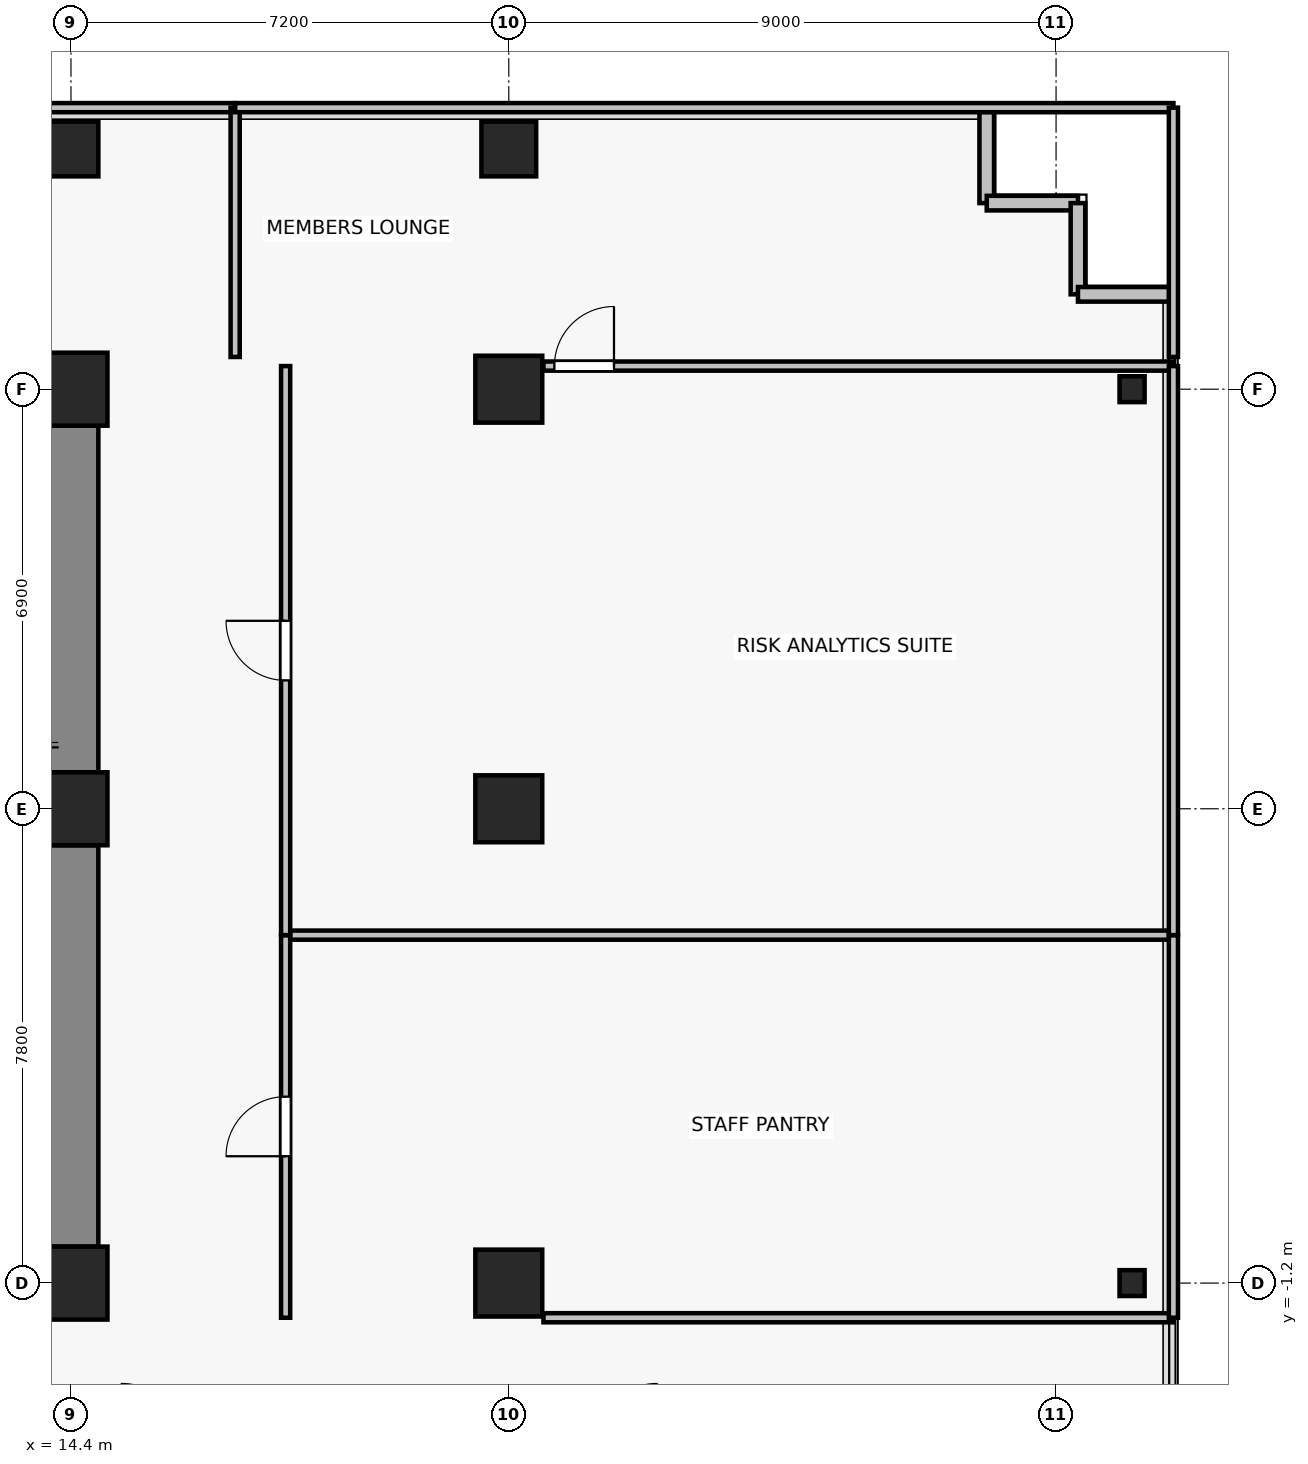
"""IFC4 building model, lengths in metres.
Left out: names, types, materials, properties, quantities, classifications, styles, units other than length and angle.
Written with IfcOpenShell. Run it as: python <this file> out.ifc"""

import sys

from ifc_helpers import new_model, si_unit, direction, frame, frame_2d, origin, origin_2d, place, context, subcontext, project, spatial, rectangle, i_section, extrude, source, transform, mapped, element, fill, save


model = new_model("IFC4")
c1 = context("Model", 3, precision=1e-05, world=origin(), true_north=direction((0.0, 1.0)))
c2 = subcontext(c1, "Body", "Model", "MODEL_VIEW")
j1 = project(units=[si_unit("LENGTHUNIT", "METRE"), si_unit("PLANEANGLEUNIT", "RADIAN")], contexts=[c1])
p1 = place(None, origin())
s1 = spatial("IfcSite", under=j1, at=p1, CompositionType="ELEMENT")
p2 = place(p1, origin())
s2 = spatial("IfcBuilding", under=s1, at=p2, CompositionType="ELEMENT")
p3 = place(p2, frame((0.0, 0.0, 67.0)))
s3 = spatial("IfcBuildingStorey", under=s2, at=p3, CompositionType="ELEMENT", Elevation=67.0)
for number, where, z_axis, x_axis in (
    (1, (14.4, -1.2, 0.0), (0.0, 0.0, 1.0), (1.0, 0.0, 0.0)),
    (2, (14.4, 6.6, 0.0), (0.0, 0.0, 1.0), (1.0, 0.0, 0.0)),
    (3, (14.4, 13.5, 0.0), (0.0, 0.0, 1.0), (1.0, 0.0, 0.0)),
):
    element("IfcColumn", number, at=place(p3, frame(where, z_axis=z_axis, x_axis=x_axis)), inside=s3, PredefinedType="COLUMN", context=c2, shape_type="SweptSolid", body=[
        extrude(rectangle(XDim=1.2, YDim=1.2, at=origin_2d()), origin(), (0.0, 0.0, 1.0), 3.3),
    ])
for number, where, z_axis, x_axis in (
    (4, (21.6, -1.2, 0.0), (0.0, 0.0, 1.0), (1.0, 0.0, 0.0)),
    (5, (21.6, 6.6, 0.0), (0.0, 0.0, 1.0), (1.0, 0.0, 0.0)),
    (6, (21.6, 13.5, 0.0), (0.0, 0.0, 1.0), (1.0, 0.0, 0.0)),
):
    element("IfcColumn", number, at=place(p3, frame(where, z_axis=z_axis, x_axis=x_axis)), inside=s3, PredefinedType="COLUMN", context=c2, shape_type="SweptSolid", body=[
        extrude(rectangle(XDim=1.1, YDim=1.1, at=origin_2d()), origin(), (0.0, 0.0, 1.0), 3.3),
    ])
for number, where, z_axis, x_axis in (
    (7, (14.4, 17.45, 0.0), (0.0, 0.0, 1.0), (1.0, 0.0, 0.0)),
    (8, (21.6, 17.45, 0.0), (0.0, 0.0, 1.0), (1.0, 0.0, 0.0)),
):
    element("IfcColumn", number, at=place(p3, frame(where, z_axis=z_axis, x_axis=x_axis)), inside=s3, PredefinedType="COLUMN", context=c2, shape_type="SweptSolid", body=[
        extrude(rectangle(XDim=0.9, YDim=0.9, at=origin_2d()), origin(), (0.0, 0.0, 1.0), 3.3),
    ])
for number, where, z_axis, x_axis in (
    (9, (31.85, -1.2, 0.0), (0.0, 0.0, 1.0), (1.0, 0.0, 0.0)),
    (10, (31.85, 13.5, 0.0), (0.0, 0.0, 1.0), (1.0, 0.0, 0.0)),
):
    element("IfcColumn", number, at=place(p3, frame(where, z_axis=z_axis, x_axis=x_axis)), inside=s3, PredefinedType="COLUMN", context=c2, shape_type="SweptSolid", body=[
        extrude(i_section(OverallWidth=0.412, OverallDepth=0.425, WebThickness=0.026, FlangeThickness=0.039, FilletRadius=0.015, at=origin_2d()), origin(), (0.0, 0.0, 1.0), 3.3),
    ])
p4 = place(p3, frame((14.4, -0.6, 0.0), z_axis=(0.0, 0.0, 1.0), x_axis=(0.0, 1.0, 0.0)))
e11 = element("IfcWall", 11, at=p4, inside=s3, PredefinedType="SHEAR", context=c2, shape_type="SweptSolid", body=[
    extrude(rectangle(XDim=6.6, YDim=0.9, at=frame_2d((3.3, 0.0))), origin(), (0.0, 0.0, 1.0), 3.075),
])
p5 = place(p3, frame((14.4, 7.2, 0.0), z_axis=(0.0, 0.0, 1.0), x_axis=(0.0, 1.0, 0.0)))
e12 = element("IfcWall", 12, at=p5, inside=s3, PredefinedType="SHEAR", context=c2, shape_type="SweptSolid", body=[
    extrude(rectangle(XDim=5.7, YDim=0.9, at=frame_2d((2.85, 0.0))), origin(), (0.0, 0.0, 1.0), 3.075),
])
for number, where, z_axis, x_axis in (
    (13, (29.46, 16.56, 0.0), (0.0, 0.0, 1.0), (0.0, 1.0, 0.0)),
    (14, (30.96, 16.56, 0.0), (0.0, 0.0, 1.0), (-1.0, 0.0, 0.0)),
    (15, (30.96, 15.06, 0.0), (0.0, 0.0, 1.0), (0.0, 1.0, 0.0)),
    (16, (32.46, 15.06, 0.0), (0.0, 0.0, 1.0), (-1.0, 0.0, 0.0)),
):
    element("IfcWall", number, at=place(p3, frame(where, z_axis=z_axis, x_axis=x_axis)), inside=s3, PredefinedType="SOLIDWALL", context=c2, shape_type="SweptSolid", body=[
        extrude(rectangle(XDim=1.5, YDim=0.24, at=frame_2d((0.75, 0.0))), origin(), (0.0, 0.0, 1.0), 3.075),
    ])
p6 = place(p3, frame((32.53, -1.77, 0.0), z_axis=(0.0, 0.0, 1.0), x_axis=(-1.0, 0.0, 0.0)))
e17 = element("IfcWall", 17, at=p6, inside=s3, PredefinedType="PARTITIONING", context=c2, shape_type="SweptSolid", body=[
    extrude(rectangle(XDim=10.36, YDim=0.15, at=frame_2d((5.18, 0.0))), origin(), (0.0, 0.0, 1.0), 2.465),
])
p7 = place(p3, frame((17.93, 4.522, 0.0), z_axis=(0.0, 0.0, 1.0), x_axis=(1.0, 0.0, 0.0)))
e18 = element("IfcWall", 18, at=p7, inside=s3, PredefinedType="PARTITIONING", context=c2, shape_type="SweptSolid", body=[
    extrude(rectangle(XDim=14.6, YDim=0.15, at=frame_2d((7.3, 0.0))), origin(), (0.0, 0.0, 1.0), 2.465),
])
p8 = place(p3, frame((17.93, -1.77, 0.0), z_axis=(0.0, 0.0, 1.0), x_axis=(0.0, 1.0, 0.0)))
e19 = element("IfcWall", 19, at=p8, inside=s3, PredefinedType="PARTITIONING", context=c2, shape_type="SweptSolid", body=[
    extrude(rectangle(XDim=6.292, YDim=0.15, at=frame_2d((3.146, 0.0))), origin(), (0.0, 0.0, 1.0), 2.465),
])
p9 = place(p8, frame((2.656, 0.0, 0.0)))
e20 = element("IfcOpeningElement", 20, at=p9, cuts=e19, PredefinedType="OPENING", context=c2, shape_type="SweptSolid", body=[
    extrude(rectangle(XDim=0.98, YDim=2.15, at=frame_2d((0.49, 1.075))), frame((0.0, 0.085, 0.0), z_axis=(0.0, -1.0, 0.0), x_axis=(1.0, 0.0, 0.0)), (0.0, 0.0, 1.0), 0.17),
])
p10 = place(p3, frame((32.53, 4.522, 0.0), z_axis=(0.0, 0.0, 1.0), x_axis=(0.0, -1.0, 0.0)))
e21 = element("IfcWall", 21, at=p10, inside=s3, PredefinedType="PARTITIONING", context=c2, shape_type="SweptSolid", body=[
    extrude(rectangle(XDim=6.292, YDim=0.15, at=frame_2d((3.146, 0.0))), origin(), (0.0, 0.0, 1.0), 3.075),
])
p11 = place(p3, frame((22.17, 13.88, 0.0), z_axis=(0.0, 0.0, 1.0), x_axis=(1.0, 0.0, 0.0)))
e22 = element("IfcWall", 22, at=p11, inside=s3, PredefinedType="PARTITIONING", context=c2, shape_type="SweptSolid", body=[
    extrude(rectangle(XDim=10.36, YDim=0.15, at=frame_2d((5.18, 0.0))), origin(), (0.0, 0.0, 1.0), 3.075),
])
p12 = place(p11, frame((0.18, 0.0, 0.0)))
e23 = element("IfcOpeningElement", 23, at=p12, cuts=e22, PredefinedType="OPENING", context=c2, shape_type="SweptSolid", body=[
    extrude(rectangle(XDim=0.98, YDim=2.15, at=frame_2d((0.49, 1.075))), frame((0.0, 0.085, 0.0), z_axis=(0.0, -1.0, 0.0), x_axis=(1.0, 0.0, 0.0)), (0.0, 0.0, 1.0), 0.17),
])
p13 = place(p3, frame((17.93, 4.522, 0.0), z_axis=(0.0, 0.0, 1.0), x_axis=(0.0, 1.0, 0.0)))
e24 = element("IfcWall", 24, at=p13, inside=s3, PredefinedType="PARTITIONING", context=c2, shape_type="SweptSolid", body=[
    extrude(rectangle(XDim=9.358, YDim=0.15, at=frame_2d((4.679, 0.0))), origin(), (0.0, 0.0, 1.0), 2.465),
])
p14 = place(p13, frame((4.189, 0.0, 0.0)))
e25 = element("IfcOpeningElement", 25, at=p14, cuts=e24, PredefinedType="OPENING", context=c2, shape_type="SweptSolid", body=[
    extrude(rectangle(XDim=0.98, YDim=2.15, at=frame_2d((0.49, 1.075))), frame((0.0, 0.085, 0.0), z_axis=(0.0, -1.0, 0.0), x_axis=(1.0, 0.0, 0.0)), (0.0, 0.0, 1.0), 0.17),
])
p15 = place(p3, frame((32.53, 13.88, 0.0), z_axis=(0.0, 0.0, 1.0), x_axis=(0.0, -1.0, 0.0)))
e26 = element("IfcWall", 26, at=p15, inside=s3, PredefinedType="PARTITIONING", context=c2, shape_type="SweptSolid", body=[
    extrude(rectangle(XDim=9.358, YDim=0.15, at=frame_2d((4.679, 0.0))), origin(), (0.0, 0.0, 1.0), 3.075),
])
p16 = place(p3, frame((-28.53, 18.13, 0.0), z_axis=(0.0, 0.0, 1.0), x_axis=(1.0, 0.0, 0.0)))
e27 = element("IfcWall", 27, at=p16, inside=s3, PredefinedType="PARTITIONING", context=c2, shape_type="SweptSolid", body=[
    extrude(rectangle(XDim=45.63, YDim=0.15, at=frame_2d((22.815, 0.0))), origin(), (0.0, 0.0, 1.0), 3.075),
])
p17 = place(p3, frame((17.1, 18.13, 0.0), z_axis=(0.0, 0.0, 1.0), x_axis=(0.0, -1.0, 0.0)))
e28 = element("IfcWall", 28, at=p17, inside=s3, PredefinedType="PARTITIONING", context=c2, shape_type="SweptSolid", body=[
    extrude(rectangle(XDim=4.1, YDim=0.15, at=frame_2d((2.05, 0.0))), origin(), (0.0, 0.0, 1.0), 2.465),
])
p18 = place(p3, frame((17.1, 18.13, 0.0), z_axis=(0.0, 0.0, 1.0), x_axis=(1.0, 0.0, 0.0)))
e29 = element("IfcWall", 29, at=p18, inside=s3, PredefinedType="PARTITIONING", context=c2, shape_type="SweptSolid", body=[
    extrude(rectangle(XDim=15.43, YDim=0.15, at=frame_2d((7.715, 0.0))), origin(), (0.0, 0.0, 1.0), 3.075),
])
p19 = place(p3, frame((32.53, 18.13, 0.0), z_axis=(0.0, 0.0, 1.0), x_axis=(0.0, -1.0, 0.0)))
e30 = element("IfcWall", 30, at=p19, inside=s3, PredefinedType="PARTITIONING", context=c2, shape_type="SweptSolid", body=[
    extrude(rectangle(XDim=4.1, YDim=0.15, at=frame_2d((2.05, 0.0))), origin(), (0.0, 0.0, 1.0), 3.075),
])
m1 = source(origin(), c2, "Body", "SweptSolid", [
    extrude(rectangle(XDim=0.98, YDim=2.15, at=frame_2d((0.49, 1.075))), frame((0.0, 0.025, 0.0), z_axis=(0.0, -1.0, 0.0), x_axis=(1.0, 0.0, 0.0)), (0.0, 0.0, 1.0), 0.05),
])
p20 = place(p9, origin())
e31 = element("IfcDoor", 31, at=p20, inside=s3, OperationType="SINGLE_SWING_LEFT", PredefinedType="DOOR", context=c2, shape_type="MappedRepresentation", body=[
    mapped(m1, transform((0.0, 0.0, 0.0), x_axis=(1.0, 0.0, 0.0), y_axis=(0.0, 1.0, 0.0), z_axis=(0.0, 0.0, 1.0), scale=1.0)),
])
fill(e20, e31)
p21 = place(p14, origin())
e32 = element("IfcDoor", 32, at=p21, inside=s3, OperationType="SINGLE_SWING_RIGHT", PredefinedType="DOOR", context=c2, shape_type="MappedRepresentation", body=[
    mapped(m1, transform((0.0, 0.0, 0.0), x_axis=(1.0, 0.0, 0.0), y_axis=(0.0, 1.0, 0.0), z_axis=(0.0, 0.0, 1.0), scale=1.0)),
])
fill(e25, e32)
p22 = place(p12, origin())
e33 = element("IfcDoor", 33, at=p22, inside=s3, OperationType="SINGLE_SWING_RIGHT", PredefinedType="DOOR", context=c2, shape_type="MappedRepresentation", body=[
    mapped(m1, transform((0.0, 0.0, 0.0), x_axis=(1.0, 0.0, 0.0), y_axis=(0.0, 1.0, 0.0), z_axis=(0.0, 0.0, 1.0), scale=1.0)),
])
fill(e23, e33)
save(model, sys.argv[1])
